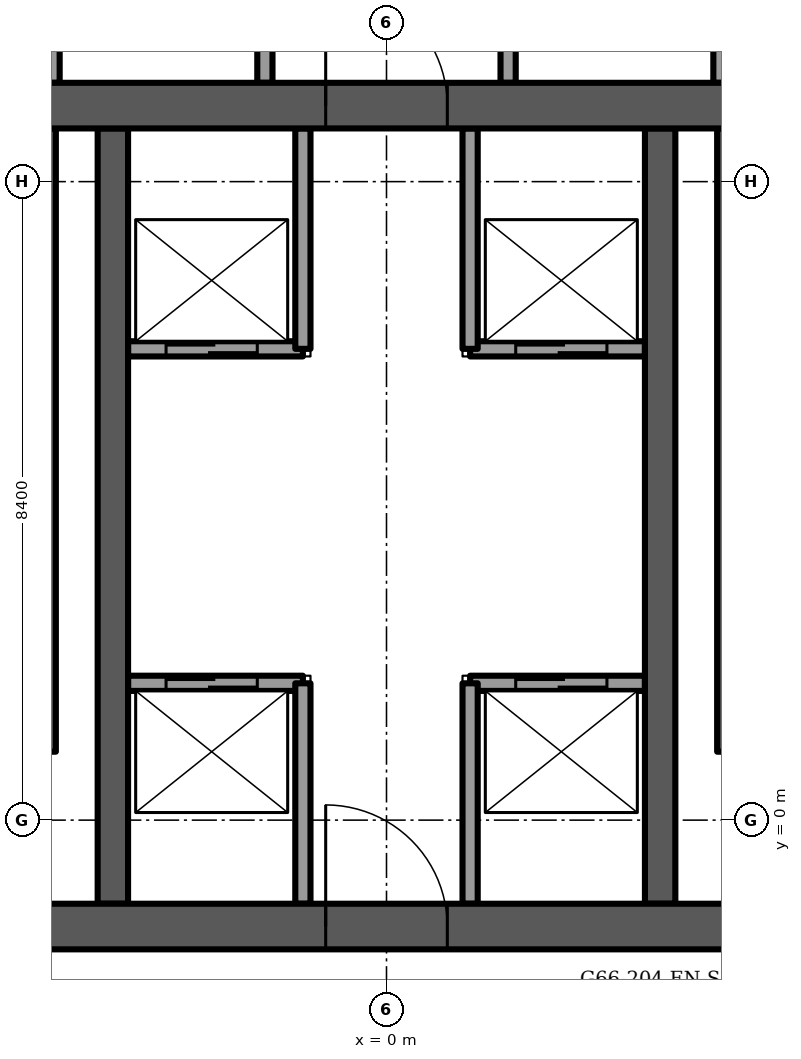
"""IFC4 building model, lengths in metres.
Left out: names, types, materials, properties, quantities, classifications, styles, units other than length and angle.
Written with IfcOpenShell. Run it as: python <this file> out.ifc"""

import sys

from ifc_helpers import new_model, si_unit, direction, frame, frame_2d, origin, place, context, subcontext, project, spatial, rectangle, extrude, element, fill, save


model = new_model("IFC4")
c1 = context("Model", 3, precision=1e-05, world=origin(), true_north=direction((0.0, 1.0)))
c2 = subcontext(c1, "Body", "Model", "MODEL_VIEW")
j1 = project(units=[si_unit("LENGTHUNIT", "METRE"), si_unit("PLANEANGLEUNIT", "RADIAN")], contexts=[c1])
p1 = place(None, origin())
s1 = spatial("IfcSite", under=j1, at=p1, CompositionType="ELEMENT")
p2 = place(p1, origin())
s2 = spatial("IfcBuilding", under=s1, at=p2, CompositionType="ELEMENT")
p3 = place(p2, frame((0.0, 0.0, 267.5)))
s3 = spatial("IfcBuildingStorey", under=s2, at=p3, CompositionType="ELEMENT", Elevation=267.5)
p4 = place(p3, frame((-8.5, -1.4, -0.3), z_axis=(0.0, 0.0, 1.0), x_axis=(1.0, 0.0, 0.0)))
e1 = element("IfcWall", 1, at=p4, inside=s3, PredefinedType="SHEAR", context=c2, shape_type="SweptSolid", body=[
    extrude(rectangle(XDim=17.0, YDim=0.6, at=frame_2d((8.5, 0.0))), origin(), (0.0, 0.0, 1.0), 3.75),
])
p5 = place(p4, frame((7.7, 0.0, 0.0)))
e2 = element("IfcOpeningElement", 2, at=p5, cuts=e1, PredefinedType="OPENING", context=c2, shape_type="SweptSolid", body=[
    extrude(rectangle(XDim=1.6, YDim=2.1, at=frame_2d((0.8, 1.05))), frame((0.0, 0.3, 0.0), z_axis=(0.0, -1.0, 0.0), x_axis=(1.0, 0.0, 0.0)), (0.0, 0.0, 1.0), 0.6),
])
p6 = place(p3, frame((-8.5, 9.4, -0.3), z_axis=(0.0, 0.0, 1.0), x_axis=(1.0, 0.0, 0.0)))
e3 = element("IfcWall", 3, at=p6, inside=s3, PredefinedType="SHEAR", context=c2, shape_type="SweptSolid", body=[
    extrude(rectangle(XDim=17.0, YDim=0.6, at=frame_2d((8.5, 0.0))), origin(), (0.0, 0.0, 1.0), 3.75),
])
p7 = place(p6, frame((7.7, 0.0, 0.0)))
e4 = element("IfcOpeningElement", 4, at=p7, cuts=e3, PredefinedType="OPENING", context=c2, shape_type="SweptSolid", body=[
    extrude(rectangle(XDim=1.6, YDim=2.1, at=frame_2d((0.8, 1.05))), frame((0.0, 0.3, 0.0), z_axis=(0.0, -1.0, 0.0), x_axis=(1.0, 0.0, 0.0)), (0.0, 0.0, 1.0), 0.6),
])
p8 = place(p6, frame((1.75, 0.0, 0.0)))
e5 = element("IfcOpeningElement", 5, at=p8, cuts=e3, PredefinedType="OPENING", context=c2, shape_type="SweptSolid", body=[
    extrude(rectangle(XDim=1.1, YDim=2.1, at=frame_2d((0.55, 1.05))), frame((0.0, 0.3, 0.0), z_axis=(0.0, -1.0, 0.0), x_axis=(1.0, 0.0, 0.0)), (0.0, 0.0, 1.0), 0.6),
])
p9 = place(p6, frame((14.15, 0.0, 0.0)))
e6 = element("IfcOpeningElement", 6, at=p9, cuts=e3, PredefinedType="OPENING", context=c2, shape_type="SweptSolid", body=[
    extrude(rectangle(XDim=1.1, YDim=2.1, at=frame_2d((0.55, 1.05))), frame((0.0, 0.3, 0.0), z_axis=(0.0, -1.0, 0.0), x_axis=(1.0, 0.0, 0.0)), (0.0, 0.0, 1.0), 0.6),
])
for number, where, z_axis, x_axis in (
    (7, (-3.6, -1.1, -0.3), (0.0, 0.0, 1.0), (0.0, 1.0, 0.0)),
    (8, (3.6, -1.1, -0.3), (0.0, 0.0, 1.0), (0.0, 1.0, 0.0)),
):
    element("IfcWall", number, at=place(p3, frame(where, z_axis=z_axis, x_axis=x_axis)), inside=s3, PredefinedType="SHEAR", context=c2, shape_type="SweptSolid", body=[
        extrude(rectangle(XDim=10.2, YDim=0.4, at=frame_2d((5.1, 0.0))), origin(), (0.0, 0.0, 1.0), 3.75),
    ])
p10 = place(p3, frame((-3.4, 1.8, 0.0), z_axis=(0.0, 0.0, 1.0), x_axis=(1.0, 0.0, 0.0)))
e9 = element("IfcWall", 9, at=p10, inside=s3, PredefinedType="PARTITIONING", context=c2, shape_type="SweptSolid", body=[
    extrude(rectangle(XDim=2.3, YDim=0.2, at=frame_2d((1.15, 0.0))), origin(), (0.0, 0.0, 1.0), 3.45),
])
p11 = place(p10, frame((0.5, 0.0, 0.0)))
e10 = element("IfcOpeningElement", 10, at=p11, cuts=e9, PredefinedType="OPENING", context=c2, shape_type="SweptSolid", body=[
    extrude(rectangle(XDim=1.2, YDim=2.1, at=frame_2d((0.6, 1.05))), frame((0.0, 0.1, 0.0), z_axis=(0.0, -1.0, 0.0), x_axis=(1.0, 0.0, 0.0)), (0.0, 0.0, 1.0), 0.2),
])
p12 = place(p3, frame((-3.4, 6.2, 0.0), z_axis=(0.0, 0.0, 1.0), x_axis=(1.0, 0.0, 0.0)))
e11 = element("IfcWall", 11, at=p12, inside=s3, PredefinedType="PARTITIONING", context=c2, shape_type="SweptSolid", body=[
    extrude(rectangle(XDim=2.3, YDim=0.2, at=frame_2d((1.15, 0.0))), origin(), (0.0, 0.0, 1.0), 3.45),
])
p13 = place(p12, frame((0.5, 0.0, 0.0)))
e12 = element("IfcOpeningElement", 12, at=p13, cuts=e11, PredefinedType="OPENING", context=c2, shape_type="SweptSolid", body=[
    extrude(rectangle(XDim=1.2, YDim=2.1, at=frame_2d((0.6, 1.05))), frame((0.0, 0.1, 0.0), z_axis=(0.0, -1.0, 0.0), x_axis=(1.0, 0.0, 0.0)), (0.0, 0.0, 1.0), 0.2),
])
p14 = place(p3, frame((1.1, 1.8, 0.0), z_axis=(0.0, 0.0, 1.0), x_axis=(1.0, 0.0, 0.0)))
e13 = element("IfcWall", 13, at=p14, inside=s3, PredefinedType="PARTITIONING", context=c2, shape_type="SweptSolid", body=[
    extrude(rectangle(XDim=2.3, YDim=0.2, at=frame_2d((1.15, 0.0))), origin(), (0.0, 0.0, 1.0), 3.45),
])
p15 = place(p14, frame((0.6, 0.0, 0.0)))
e14 = element("IfcOpeningElement", 14, at=p15, cuts=e13, PredefinedType="OPENING", context=c2, shape_type="SweptSolid", body=[
    extrude(rectangle(XDim=1.2, YDim=2.1, at=frame_2d((0.6, 1.05))), frame((0.0, 0.1, 0.0), z_axis=(0.0, -1.0, 0.0), x_axis=(1.0, 0.0, 0.0)), (0.0, 0.0, 1.0), 0.2),
])
p16 = place(p3, frame((1.1, 6.2, 0.0), z_axis=(0.0, 0.0, 1.0), x_axis=(1.0, 0.0, 0.0)))
e15 = element("IfcWall", 15, at=p16, inside=s3, PredefinedType="PARTITIONING", context=c2, shape_type="SweptSolid", body=[
    extrude(rectangle(XDim=2.3, YDim=0.2, at=frame_2d((1.15, 0.0))), origin(), (0.0, 0.0, 1.0), 3.45),
])
p17 = place(p16, frame((0.6, 0.0, 0.0)))
e16 = element("IfcOpeningElement", 16, at=p17, cuts=e15, PredefinedType="OPENING", context=c2, shape_type="SweptSolid", body=[
    extrude(rectangle(XDim=1.2, YDim=2.1, at=frame_2d((0.6, 1.05))), frame((0.0, 0.1, 0.0), z_axis=(0.0, -1.0, 0.0), x_axis=(1.0, 0.0, 0.0)), (0.0, 0.0, 1.0), 0.2),
])
for number, where, z_axis, x_axis in (
    (17, (-1.1, -1.1, 0.0), (0.0, 0.0, 1.0), (0.0, 1.0, 0.0)),
    (18, (1.1, -1.1, 0.0), (0.0, 0.0, 1.0), (0.0, 1.0, 0.0)),
    (19, (-1.1, 6.2, 0.0), (0.0, 0.0, 1.0), (0.0, 1.0, 0.0)),
    (20, (1.1, 6.2, 0.0), (0.0, 0.0, 1.0), (0.0, 1.0, 0.0)),
):
    element("IfcWall", number, at=place(p3, frame(where, z_axis=z_axis, x_axis=x_axis)), inside=s3, PredefinedType="PARTITIONING", context=c2, shape_type="SweptSolid", body=[
        extrude(rectangle(XDim=2.9, YDim=0.2, at=frame_2d((1.45, 0.0))), origin(), (0.0, 0.0, 1.0), 3.45),
    ])
for number, where, z_axis, x_axis in (
    (21, (-4.45, 0.9, -0.3), (0.0, 0.0, 1.0), (0.0, 1.0, 0.0)),
    (22, (4.45, 0.9, -0.3), (0.0, 0.0, 1.0), (0.0, 1.0, 0.0)),
):
    element("IfcWall", number, at=place(p3, frame(where, z_axis=z_axis, x_axis=x_axis)), inside=s3, PredefinedType="SOLIDWALL", context=c2, shape_type="SweptSolid", body=[
        extrude(rectangle(XDim=8.2, YDim=0.2, at=frame_2d((4.1, 0.0))), origin(), (0.0, 0.0, 1.0), 3.75),
    ])
p18 = place(p3, frame((-4.4, 9.7, 0.0), z_axis=(0.0, 0.0, 1.0), x_axis=(0.0, 1.0, 0.0)))
e23 = element("IfcWall", 23, at=p18, inside=s3, PredefinedType="PARTITIONING", context=c2, shape_type="SweptSolid", body=[
    extrude(rectangle(XDim=3.9, YDim=0.2, at=frame_2d((1.95, 0.0))), origin(), (0.0, 0.0, 1.0), 3.45),
])
p19 = place(p18, frame((1.35, 0.0, 0.0)))
e24 = element("IfcOpeningElement", 24, at=p19, cuts=e23, PredefinedType="OPENING", context=c2, shape_type="SweptSolid", body=[
    extrude(rectangle(XDim=1.2, YDim=2.1, at=frame_2d((0.6, 1.05))), frame((0.0, 0.1, 0.0), z_axis=(0.0, -1.0, 0.0), x_axis=(1.0, 0.0, 0.0)), (0.0, 0.0, 1.0), 0.2),
])
p20 = place(p3, frame((4.4, 9.7, 0.0), z_axis=(0.0, 0.0, 1.0), x_axis=(0.0, 1.0, 0.0)))
e25 = element("IfcWall", 25, at=p20, inside=s3, PredefinedType="PARTITIONING", context=c2, shape_type="SweptSolid", body=[
    extrude(rectangle(XDim=3.9, YDim=0.2, at=frame_2d((1.95, 0.0))), origin(), (0.0, 0.0, 1.0), 3.45),
])
p21 = place(p20, frame((1.35, 0.0, 0.0)))
e26 = element("IfcOpeningElement", 26, at=p21, cuts=e25, PredefinedType="OPENING", context=c2, shape_type="SweptSolid", body=[
    extrude(rectangle(XDim=1.2, YDim=2.1, at=frame_2d((0.6, 1.05))), frame((0.0, 0.1, 0.0), z_axis=(0.0, -1.0, 0.0), x_axis=(1.0, 0.0, 0.0)), (0.0, 0.0, 1.0), 0.2),
])
for number, where, z_axis, x_axis in (
    (27, (-1.6, 9.7, 0.0), (0.0, 0.0, 1.0), (0.0, 1.0, 0.0)),
    (28, (1.6, 9.7, 0.0), (0.0, 0.0, 1.0), (0.0, 1.0, 0.0)),
):
    element("IfcWall", number, at=place(p3, frame(where, z_axis=z_axis, x_axis=x_axis)), inside=s3, PredefinedType="PARTITIONING", context=c2, shape_type="SweptSolid", body=[
        extrude(rectangle(XDim=3.9, YDim=0.2, at=frame_2d((1.95, 0.0))), origin(), (0.0, 0.0, 1.0), 3.45),
    ])
p22 = place(p11, origin())
e29 = element("IfcDoor", 29, at=p22, inside=s3, OperationType="SLIDING_TO_LEFT", PredefinedType="DOOR", context=c2, shape_type="SweptSolid", body=[
    extrude(rectangle(XDim=1.2, YDim=2.1, at=frame_2d((0.6, 1.05))), frame((0.0, 0.025, 0.0), z_axis=(0.0, -1.0, 0.0), x_axis=(1.0, 0.0, 0.0)), (0.0, 0.0, 1.0), 0.05),
])
fill(e10, e29)
p23 = place(p15, origin())
e30 = element("IfcDoor", 30, at=p23, inside=s3, OperationType="SLIDING_TO_LEFT", PredefinedType="DOOR", context=c2, shape_type="SweptSolid", body=[
    extrude(rectangle(XDim=1.2, YDim=2.1, at=frame_2d((0.6, 1.05))), frame((0.0, 0.025, 0.0), z_axis=(0.0, -1.0, 0.0), x_axis=(1.0, 0.0, 0.0)), (0.0, 0.0, 1.0), 0.05),
])
fill(e14, e30)
p24 = place(p13, origin())
e31 = element("IfcDoor", 31, at=p24, inside=s3, OperationType="SLIDING_TO_LEFT", PredefinedType="DOOR", context=c2, shape_type="SweptSolid", body=[
    extrude(rectangle(XDim=1.2, YDim=2.1, at=frame_2d((0.6, 1.05))), frame((0.0, 0.025, 0.0), z_axis=(0.0, -1.0, 0.0), x_axis=(1.0, 0.0, 0.0)), (0.0, 0.0, 1.0), 0.05),
])
fill(e12, e31)
p25 = place(p17, origin())
e32 = element("IfcDoor", 32, at=p25, inside=s3, OperationType="SLIDING_TO_LEFT", PredefinedType="DOOR", context=c2, shape_type="SweptSolid", body=[
    extrude(rectangle(XDim=1.2, YDim=2.1, at=frame_2d((0.6, 1.05))), frame((0.0, 0.025, 0.0), z_axis=(0.0, -1.0, 0.0), x_axis=(1.0, 0.0, 0.0)), (0.0, 0.0, 1.0), 0.05),
])
fill(e16, e32)
p26 = place(p5, origin())
e33 = element("IfcDoor", 33, at=p26, inside=s3, OperationType="DOUBLE_DOOR_SINGLE_SWING", PredefinedType="DOOR", context=c2, shape_type="SweptSolid", body=[
    extrude(rectangle(XDim=1.6, YDim=2.1, at=frame_2d((0.8, 1.05))), frame((0.0, 0.025, 0.0), z_axis=(0.0, -1.0, 0.0), x_axis=(1.0, 0.0, 0.0)), (0.0, 0.0, 1.0), 0.05),
])
fill(e2, e33)
p27 = place(p7, origin())
e34 = element("IfcDoor", 34, at=p27, inside=s3, OperationType="DOUBLE_DOOR_SINGLE_SWING", PredefinedType="DOOR", context=c2, shape_type="SweptSolid", body=[
    extrude(rectangle(XDim=1.6, YDim=2.1, at=frame_2d((0.8, 1.05))), frame((0.0, 0.025, 0.0), z_axis=(0.0, -1.0, 0.0), x_axis=(1.0, 0.0, 0.0)), (0.0, 0.0, 1.0), 0.05),
])
fill(e4, e34)
save(model, sys.argv[1])
